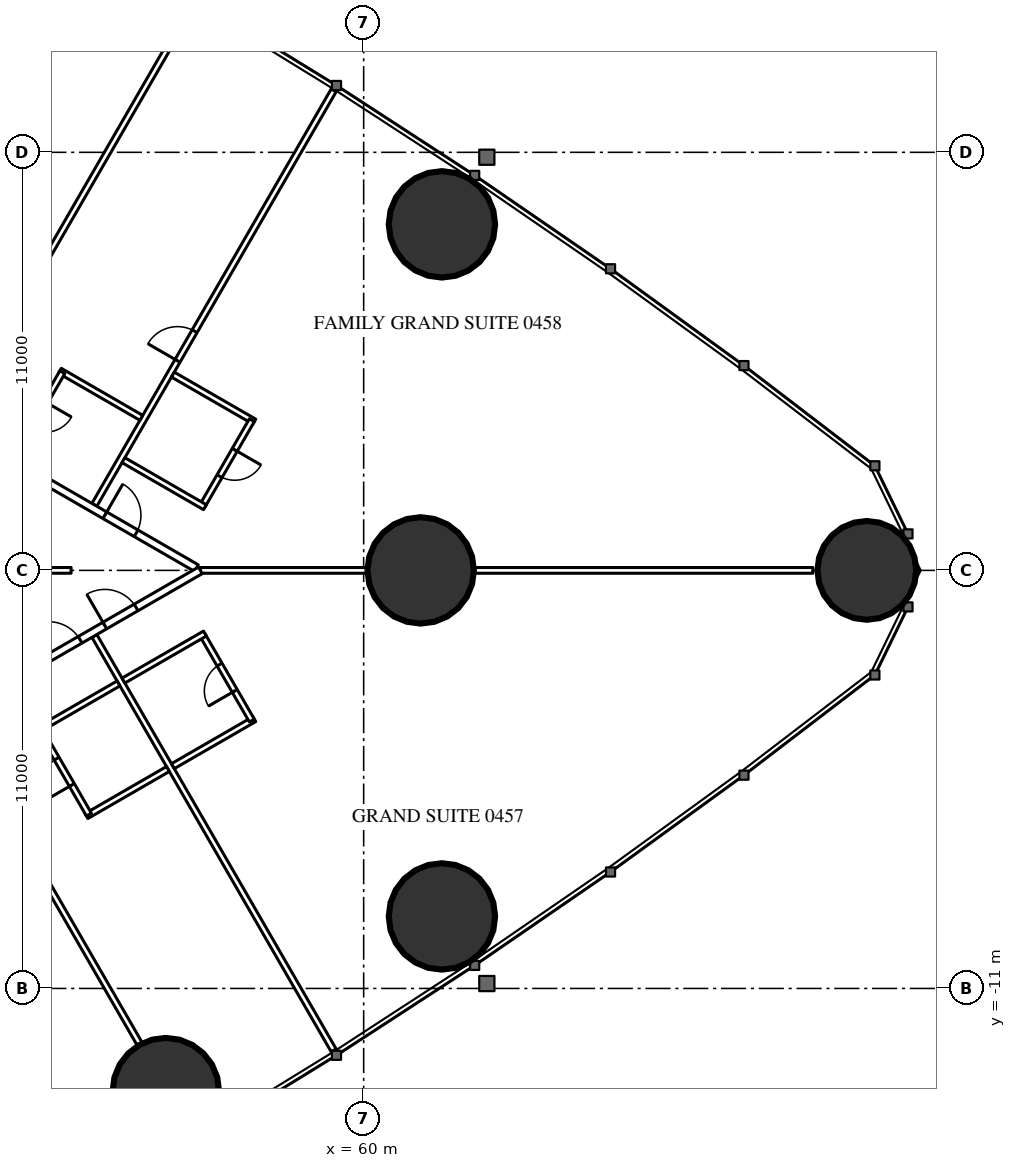
"""IFC4 building model, lengths in metres.
Left out: names, types, materials, properties, quantities, classifications, styles, units other than length and angle.
Written with IfcOpenShell. Run it as: python <this file> out.ifc"""

import sys

from ifc_helpers import new_model, si_unit, direction, frame, frame_2d, origin, origin_2d, place, context, subcontext, project, spatial, rectangle, hollow_circle, extrude, element, fill, save


model = new_model("IFC4")
c1 = context("Model", 3, precision=1e-05, world=origin(), true_north=direction((0.0, 1.0)))
c2 = subcontext(c1, "Body", "Model", "MODEL_VIEW")
j1 = project(units=[si_unit("LENGTHUNIT", "METRE"), si_unit("PLANEANGLEUNIT", "RADIAN")], contexts=[c1])
p1 = place(None, origin())
s1 = spatial("IfcSite", under=j1, at=p1, CompositionType="ELEMENT")
p2 = place(p1, origin())
s2 = spatial("IfcBuilding", under=s1, at=p2, CompositionType="ELEMENT")
p3 = place(p2, frame((0.0, 0.0, 21.5)))
s3 = spatial("IfcBuildingStorey", under=s2, at=p3, CompositionType="ELEMENT", Elevation=21.5)
p4 = place(p3, frame((73.239, 0.0, 0.0), z_axis=(0.0, 0.0, 1.0), x_axis=(1.0, 0.0, 0.0)))
e1 = element("IfcColumn", 1, at=p4, inside=s3, PredefinedType="COLUMN", context=c2, shape_type="SweptSolid", body=[
    extrude(hollow_circle(Radius=1.3, WallThickness=0.1, at=origin_2d()), origin(), (0.0, 0.0, 1.0), 3.5),
])
for number, where, z_axis, x_axis in (
    (2, (62.059, 9.105, 0.0), (0.0, 0.0, 1.0), (1.0, 0.0, 0.0)),
    (3, (54.795, -13.701, 0.0), (0.0, 0.0, 1.0), (1.0, 0.0, 0.0)),
    (4, (62.059, -9.105, 0.0), (0.0, 0.0, 1.0), (1.0, 0.0, 0.0)),
):
    element("IfcColumn", number, at=place(p3, frame(where, z_axis=z_axis, x_axis=x_axis)), inside=s3, PredefinedType="COLUMN", context=c2, shape_type="SweptSolid", body=[
        extrude(hollow_circle(Radius=1.4, WallThickness=0.12, at=origin_2d()), origin(), (0.0, 0.0, 1.0), 3.5),
    ])
p5 = place(p3, frame((61.5, 0.0, 0.0), z_axis=(0.0, 0.0, 1.0), x_axis=(1.0, 0.0, 0.0)))
e5 = element("IfcColumn", 5, at=p5, inside=s3, PredefinedType="COLUMN", context=c2, shape_type="SweptSolid", body=[
    extrude(hollow_circle(Radius=1.4, WallThickness=0.1, at=origin_2d()), origin(), (0.0, 0.0, 1.0), 3.5),
])
p6 = place(p3, frame((45.403, -6.062, 0.0), z_axis=(0.0, 0.0, 1.0), x_axis=(0.500007077968, -0.866021317279, 0.0)))
e6 = element("IfcWall", 6, at=p6, inside=s3, PredefinedType="PARTITIONING", context=c2, shape_type="SweptSolid", body=[
    extrude(rectangle(XDim=12.721, YDim=0.15, at=frame_2d((6.361, 0.0))), origin(), (0.0, 0.0, 1.0), 3.25),
])
p7 = place(p3, frame((49.159, -3.893, 0.0), z_axis=(0.0, 0.0, 1.0), x_axis=(0.499998773722, -0.866026111775, 0.0)))
e7 = element("IfcWall", 7, at=p7, inside=s3, PredefinedType="PARTITIONING", context=c2, shape_type="SweptSolid", body=[
    extrude(rectangle(XDim=9.892, YDim=0.15, at=frame_2d((4.946, 0.0))), origin(), (0.0, 0.0, 1.0), 2.25),
])
p8 = place(p3, frame((52.915, -1.725, 0.0), z_axis=(0.0, 0.0, 1.0), x_axis=(0.499997163113, -0.866027041656, 0.0)))
e8 = element("IfcWall", 8, at=p8, inside=s3, PredefinedType="PARTITIONING", context=c2, shape_type="SweptSolid", body=[
    extrude(rectangle(XDim=12.591, YDim=0.15, at=frame_2d((6.295, 0.0))), origin(), (0.0, 0.0, 1.0), 3.25),
])
p9 = place(p3, frame((49.159, 3.893, 0.0), z_axis=(0.0, 0.0, 1.0), x_axis=(0.499995664361, 0.866027906952, 0.0)))
e9 = element("IfcWall", 9, at=p9, inside=s3, PredefinedType="PARTITIONING", context=c2, shape_type="SweptSolid", body=[
    extrude(rectangle(XDim=12.711, YDim=0.15, at=frame_2d((6.356, 0.0))), origin(), (0.0, 0.0, 1.0), 3.25),
])
p10 = place(p3, frame((52.915, 1.725, 0.0), z_axis=(0.0, 0.0, 1.0), x_axis=(0.499997163113, 0.866027041656, 0.0)))
e10 = element("IfcWall", 10, at=p10, inside=s3, PredefinedType="PARTITIONING", context=c2, shape_type="SweptSolid", body=[
    extrude(rectangle(XDim=12.591, YDim=0.15, at=frame_2d((6.295, 0.0))), origin(), (0.0, 0.0, 1.0), 3.25),
])
p11 = place(p10, frame((4.375, 0.0, 0.0)))
e11 = element("IfcOpeningElement", 11, at=p11, cuts=e10, PredefinedType="OPENING", context=c2, shape_type="SweptSolid", body=[
    extrude(rectangle(XDim=0.9, YDim=2.2, at=frame_2d((0.45, 1.1))), frame((0.0, 0.085, 0.0), z_axis=(0.0, -1.0, 0.0), x_axis=(1.0, 0.0, 0.0)), (0.0, 0.0, 1.0), 0.17),
])
p12 = place(p3, frame((55.702, 0.0, 0.0), z_axis=(0.0, 0.0, 1.0), x_axis=(1.0, 0.0, 0.0)))
e12 = element("IfcWall", 12, at=p12, inside=s3, PredefinedType="PARTITIONING", context=c2, shape_type="SweptSolid", body=[
    extrude(rectangle(XDim=16.117, YDim=0.15, at=frame_2d((8.059, 0.0))), origin(), (0.0, 0.0, 1.0), 2.25),
])
p13 = place(p3, frame((36.834, 10.894, 0.0), z_axis=(0.0, 0.0, 1.0), x_axis=(0.866028157229, -0.499995230863, 0.0)))
e13 = element("IfcWall", 13, at=p13, inside=s3, PredefinedType="PARTITIONING", context=c2, shape_type="SweptSolid", body=[
    extrude(rectangle(XDim=21.667, YDim=0.2, at=frame_2d((10.833, 0.0))), origin(), (0.0, 0.0, 1.0), 3.25),
])
p14 = place(p13, frame((18.885, 0.0, 0.0)))
e14 = element("IfcOpeningElement", 14, at=p14, cuts=e13, PredefinedType="OPENING", context=c2, shape_type="SweptSolid", body=[
    extrude(rectangle(XDim=0.95, YDim=2.2, at=frame_2d((0.475, 1.1))), frame((0.0, 0.11, 0.0), z_axis=(0.0, -1.0, 0.0), x_axis=(1.0, 0.0, 0.0)), (0.0, 0.0, 1.0), 0.22),
])
p15 = place(p13, frame((14.835, 0.0, 0.0)))
e15 = element("IfcOpeningElement", 15, at=p15, cuts=e13, PredefinedType="OPENING", context=c2, shape_type="SweptSolid", body=[
    extrude(rectangle(XDim=0.95, YDim=2.2, at=frame_2d((0.475, 1.1))), frame((0.0, 0.11, 0.0), z_axis=(0.0, -1.0, 0.0), x_axis=(1.0, 0.0, 0.0)), (0.0, 0.0, 1.0), 0.22),
])
p16 = place(p13, frame((12.85, 0.0, 0.0)))
e16 = element("IfcOpeningElement", 16, at=p16, cuts=e13, PredefinedType="OPENING", context=c2, shape_type="SweptSolid", body=[
    extrude(rectangle(XDim=0.95, YDim=2.2, at=frame_2d((0.475, 1.1))), frame((0.0, 0.11, 0.0), z_axis=(0.0, -1.0, 0.0), x_axis=(1.0, 0.0, 0.0)), (0.0, 0.0, 1.0), 0.22),
])
p17 = place(p13, frame((1.542, 0.0, 0.0)))
e17 = element("IfcOpeningElement", 17, at=p17, cuts=e13, PredefinedType="OPENING", context=c2, shape_type="SweptSolid", body=[
    extrude(rectangle(XDim=0.95, YDim=2.2, at=frame_2d((0.475, 1.1))), frame((0.0, 0.11, 0.0), z_axis=(0.0, -1.0, 0.0), x_axis=(1.0, 0.0, 0.0)), (0.0, 0.0, 1.0), 0.22),
])
p18 = place(p3, frame((49.131, -3.794, 0.0), z_axis=(0.0, 0.0, 1.0), x_axis=(0.866030732979, 0.499990769451, 0.0)))
e18 = element("IfcWall", 18, at=p18, inside=s3, PredefinedType="PARTITIONING", context=c2, shape_type="SweptSolid", body=[
    extrude(rectangle(XDim=7.588, YDim=0.2, at=frame_2d((3.794, 0.0))), origin(), (0.0, 0.0, 1.0), 3.25),
])
p19 = place(p18, frame((2.986, 0.0, 0.0)))
e19 = element("IfcOpeningElement", 19, at=p19, cuts=e18, PredefinedType="OPENING", context=c2, shape_type="SweptSolid", body=[
    extrude(rectangle(XDim=0.95, YDim=2.2, at=frame_2d((0.475, 1.1))), frame((0.0, 0.11, 0.0), z_axis=(0.0, -1.0, 0.0), x_axis=(1.0, 0.0, 0.0)), (0.0, 0.0, 1.0), 0.22),
])
p20 = place(p18, frame((4.686, 0.0, 0.0)))
e20 = element("IfcOpeningElement", 20, at=p20, cuts=e18, PredefinedType="OPENING", context=c2, shape_type="SweptSolid", body=[
    extrude(rectangle(XDim=0.95, YDim=2.2, at=frame_2d((0.475, 1.1))), frame((0.0, 0.11, 0.0), z_axis=(0.0, -1.0, 0.0), x_axis=(1.0, 0.0, 0.0)), (0.0, 0.0, 1.0), 0.22),
])
p21 = place(p3, frame((52.706, -6.464, 0.0), z_axis=(0.0, 0.0, 1.0), x_axis=(0.86604923931, 0.499958713387, 0.0)))
e21 = element("IfcWall", 21, at=p21, inside=s3, PredefinedType="PARTITIONING", context=c2, shape_type="SweptSolid", body=[
    extrude(rectangle(XDim=2.475, YDim=0.15, at=frame_2d((1.237, 0.0))), origin(), (0.0, 0.0, 1.0), 3.25),
])
p22 = place(p3, frame((51.471, -4.175, 0.0), z_axis=(0.0, 0.0, 1.0), x_axis=(0.500006934395, -0.866021400173, 0.0)))
e22 = element("IfcWall", 22, at=p22, inside=s3, PredefinedType="PARTITIONING", context=c2, shape_type="SweptSolid", body=[
    extrude(rectangle(XDim=2.6, YDim=0.15, at=frame_2d((1.3, 0.0))), origin(), (0.0, 0.0, 1.0), 3.25),
])
p23 = place(p22, frame((0.9, 0.0, 0.0)))
e23 = element("IfcOpeningElement", 23, at=p23, cuts=e22, PredefinedType="OPENING", context=c2, shape_type="SweptSolid", body=[
    extrude(rectangle(XDim=0.8, YDim=2.2, at=frame_2d((0.4, 1.1))), frame((0.0, 0.085, 0.0), z_axis=(0.0, -1.0, 0.0), x_axis=(1.0, 0.0, 0.0)), (0.0, 0.0, 1.0), 0.17),
])
p24 = place(p3, frame((51.406, -4.212, 0.0), z_axis=(0.0, 0.0, 1.0), x_axis=(0.866031185235, 0.4999899861, 0.0)))
e24 = element("IfcWall", 24, at=p24, inside=s3, PredefinedType="PARTITIONING", context=c2, shape_type="SweptSolid", body=[
    extrude(rectangle(XDim=2.475, YDim=0.15, at=frame_2d((1.238, 0.0))), origin(), (0.0, 0.0, 1.0), 3.25),
])
p25 = place(p3, frame((54.98, -5.151, 0.0), z_axis=(0.0, 0.0, 1.0), x_axis=(0.86604923931, 0.499958713387, 0.0)))
e25 = element("IfcWall", 25, at=p25, inside=s3, PredefinedType="PARTITIONING", context=c2, shape_type="SweptSolid", body=[
    extrude(rectangle(XDim=2.475, YDim=0.15, at=frame_2d((1.237, 0.0))), origin(), (0.0, 0.0, 1.0), 3.25),
])
p26 = place(p3, frame((55.758, -1.7, 0.0), z_axis=(0.0, 0.0, 1.0), x_axis=(0.500006934395, -0.866021400173, 0.0)))
e26 = element("IfcWall", 26, at=p26, inside=s3, PredefinedType="PARTITIONING", context=c2, shape_type="SweptSolid", body=[
    extrude(rectangle(XDim=2.6, YDim=0.15, at=frame_2d((1.3, 0.0))), origin(), (0.0, 0.0, 1.0), 3.25),
])
p27 = place(p26, frame((0.9, 0.0, 0.0)))
e27 = element("IfcOpeningElement", 27, at=p27, cuts=e26, PredefinedType="OPENING", context=c2, shape_type="SweptSolid", body=[
    extrude(rectangle(XDim=0.8, YDim=2.2, at=frame_2d((0.4, 1.1))), frame((0.0, 0.085, 0.0), z_axis=(0.0, -1.0, 0.0), x_axis=(1.0, 0.0, 0.0)), (0.0, 0.0, 1.0), 0.17),
])
for number, where, z_axis, x_axis in (
    (28, (53.68, -2.9, 0.0), (0.0, 0.0, 1.0), (0.866, 0.5, 0.0)),
    (29, (54.98, 5.151, 0.0), (0.0, 0.0, 1.0), (0.866, -0.5, 0.0)),
):
    element("IfcWall", number, at=place(p3, frame(where, z_axis=z_axis, x_axis=x_axis)), inside=s3, PredefinedType="PARTITIONING", context=c2, shape_type="SweptSolid", body=[
        extrude(rectangle(XDim=2.475, YDim=0.15, at=frame_2d((1.237, 0.0))), origin(), (0.0, 0.0, 1.0), 3.25),
    ])
p28 = place(p3, frame((55.758, 1.7, 0.0), z_axis=(0.0, 0.0, 1.0), x_axis=(0.500006934395, 0.866021400173, 0.0)))
e30 = element("IfcWall", 30, at=p28, inside=s3, PredefinedType="PARTITIONING", context=c2, shape_type="SweptSolid", body=[
    extrude(rectangle(XDim=2.6, YDim=0.15, at=frame_2d((1.3, 0.0))), origin(), (0.0, 0.0, 1.0), 3.25),
])
p29 = place(p28, frame((0.9, 0.0, 0.0)))
e31 = element("IfcOpeningElement", 31, at=p29, cuts=e30, PredefinedType="OPENING", context=c2, shape_type="SweptSolid", body=[
    extrude(rectangle(XDim=0.8, YDim=2.2, at=frame_2d((0.4, 1.1))), frame((0.0, 0.085, 0.0), z_axis=(0.0, -1.0, 0.0), x_axis=(1.0, 0.0, 0.0)), (0.0, 0.0, 1.0), 0.17),
])
for number, where, z_axis, x_axis in (
    (32, (53.68, 2.9, 0.0), (0.0, 0.0, 1.0), (0.866, -0.5, 0.0)),
    (33, (52.006, 5.251, 0.0), (0.0, 0.0, 1.0), (0.866, -0.5, 0.0)),
):
    element("IfcWall", number, at=place(p3, frame(where, z_axis=z_axis, x_axis=x_axis)), inside=s3, PredefinedType="PARTITIONING", context=c2, shape_type="SweptSolid", body=[
        extrude(rectangle(XDim=2.475, YDim=0.15, at=frame_2d((1.237, 0.0))), origin(), (0.0, 0.0, 1.0), 3.25),
    ])
p30 = place(p3, frame((50.771, 2.962, 0.0), z_axis=(0.0, 0.0, 1.0), x_axis=(0.500006934395, 0.866021400173, 0.0)))
e34 = element("IfcWall", 34, at=p30, inside=s3, PredefinedType="PARTITIONING", context=c2, shape_type="SweptSolid", body=[
    extrude(rectangle(XDim=2.6, YDim=0.15, at=frame_2d((1.3, 0.0))), origin(), (0.0, 0.0, 1.0), 3.25),
])
p31 = place(p30, frame((0.9, 0.0, 0.0)))
e35 = element("IfcOpeningElement", 35, at=p31, cuts=e34, PredefinedType="OPENING", context=c2, shape_type="SweptSolid", body=[
    extrude(rectangle(XDim=0.8, YDim=2.2, at=frame_2d((0.4, 1.1))), frame((0.0, 0.085, 0.0), z_axis=(0.0, -1.0, 0.0), x_axis=(1.0, 0.0, 0.0)), (0.0, 0.0, 1.0), 0.17),
])
p32 = place(p3, frame((44.575, 0.0, 0.0), z_axis=(0.0, 0.0, 1.0), x_axis=(1.0, 0.0, 0.0)))
e36 = element("IfcWall", 36, at=p32, inside=s3, PredefinedType="PARTITIONING", context=c2, shape_type="SweptSolid", body=[
    extrude(rectangle(XDim=7.727, YDim=0.15, at=frame_2d((3.864, 0.0))), origin(), (0.0, 0.0, 1.0), 2.25),
])
p33 = place(p23, origin())
e37 = element("IfcDoor", 37, at=p33, inside=s3, OperationType="SINGLE_SWING_RIGHT", PredefinedType="DOOR", context=c2, shape_type="SweptSolid", body=[
    extrude(rectangle(XDim=0.8, YDim=2.2, at=frame_2d((0.4, 1.1))), frame((0.0, 0.025, 0.0), z_axis=(0.0, -1.0, 0.0), x_axis=(1.0, 0.0, 0.0)), (0.0, 0.0, 1.0), 0.05),
])
fill(e23, e37)
p34 = place(p19, origin())
e38 = element("IfcDoor", 38, at=p34, inside=s3, OperationType="SINGLE_SWING_LEFT", PredefinedType="DOOR", context=c2, shape_type="SweptSolid", body=[
    extrude(rectangle(XDim=0.95, YDim=2.2, at=frame_2d((0.475, 1.1))), frame((0.0, 0.025, 0.0), z_axis=(0.0, -1.0, 0.0), x_axis=(1.0, 0.0, 0.0)), (0.0, 0.0, 1.0), 0.05),
])
fill(e19, e38)
p35 = place(p27, origin())
e39 = element("IfcDoor", 39, at=p35, inside=s3, OperationType="SINGLE_SWING_RIGHT", PredefinedType="DOOR", context=c2, shape_type="SweptSolid", body=[
    extrude(rectangle(XDim=0.8, YDim=2.2, at=frame_2d((0.4, 1.1))), frame((0.0, 0.025, 0.0), z_axis=(0.0, -1.0, 0.0), x_axis=(1.0, 0.0, 0.0)), (0.0, 0.0, 1.0), 0.05),
])
fill(e27, e39)
p36 = place(p20, origin())
e40 = element("IfcDoor", 40, at=p36, inside=s3, OperationType="SINGLE_SWING_LEFT", PredefinedType="DOOR", context=c2, shape_type="SweptSolid", body=[
    extrude(rectangle(XDim=0.95, YDim=2.2, at=frame_2d((0.475, 1.1))), frame((0.0, 0.025, 0.0), z_axis=(0.0, -1.0, 0.0), x_axis=(1.0, 0.0, 0.0)), (0.0, 0.0, 1.0), 0.05),
])
fill(e20, e40)
p37 = place(p29, origin())
e41 = element("IfcDoor", 41, at=p37, inside=s3, OperationType="SINGLE_SWING_RIGHT", PredefinedType="DOOR", context=c2, shape_type="SweptSolid", body=[
    extrude(rectangle(XDim=0.8, YDim=2.2, at=frame_2d((0.4, 1.1))), frame((0.0, 0.025, 0.0), z_axis=(0.0, -1.0, 0.0), x_axis=(1.0, 0.0, 0.0)), (0.0, 0.0, 1.0), 0.05),
])
fill(e31, e41)
p38 = place(p14, origin())
e42 = element("IfcDoor", 42, at=p38, inside=s3, OperationType="SINGLE_SWING_LEFT", PredefinedType="DOOR", context=c2, shape_type="SweptSolid", body=[
    extrude(rectangle(XDim=0.95, YDim=2.2, at=frame_2d((0.475, 1.1))), frame((0.0, 0.025, 0.0), z_axis=(0.0, -1.0, 0.0), x_axis=(1.0, 0.0, 0.0)), (0.0, 0.0, 1.0), 0.05),
])
fill(e14, e42)
p39 = place(p11, origin())
e43 = element("IfcDoor", 43, at=p39, inside=s3, OperationType="SINGLE_SWING_LEFT", PredefinedType="DOOR", context=c2, shape_type="SweptSolid", body=[
    extrude(rectangle(XDim=0.9, YDim=2.2, at=frame_2d((0.45, 1.1))), frame((0.0, 0.025, 0.0), z_axis=(0.0, -1.0, 0.0), x_axis=(1.0, 0.0, 0.0)), (0.0, 0.0, 1.0), 0.05),
])
fill(e11, e43)
save(model, sys.argv[1])
